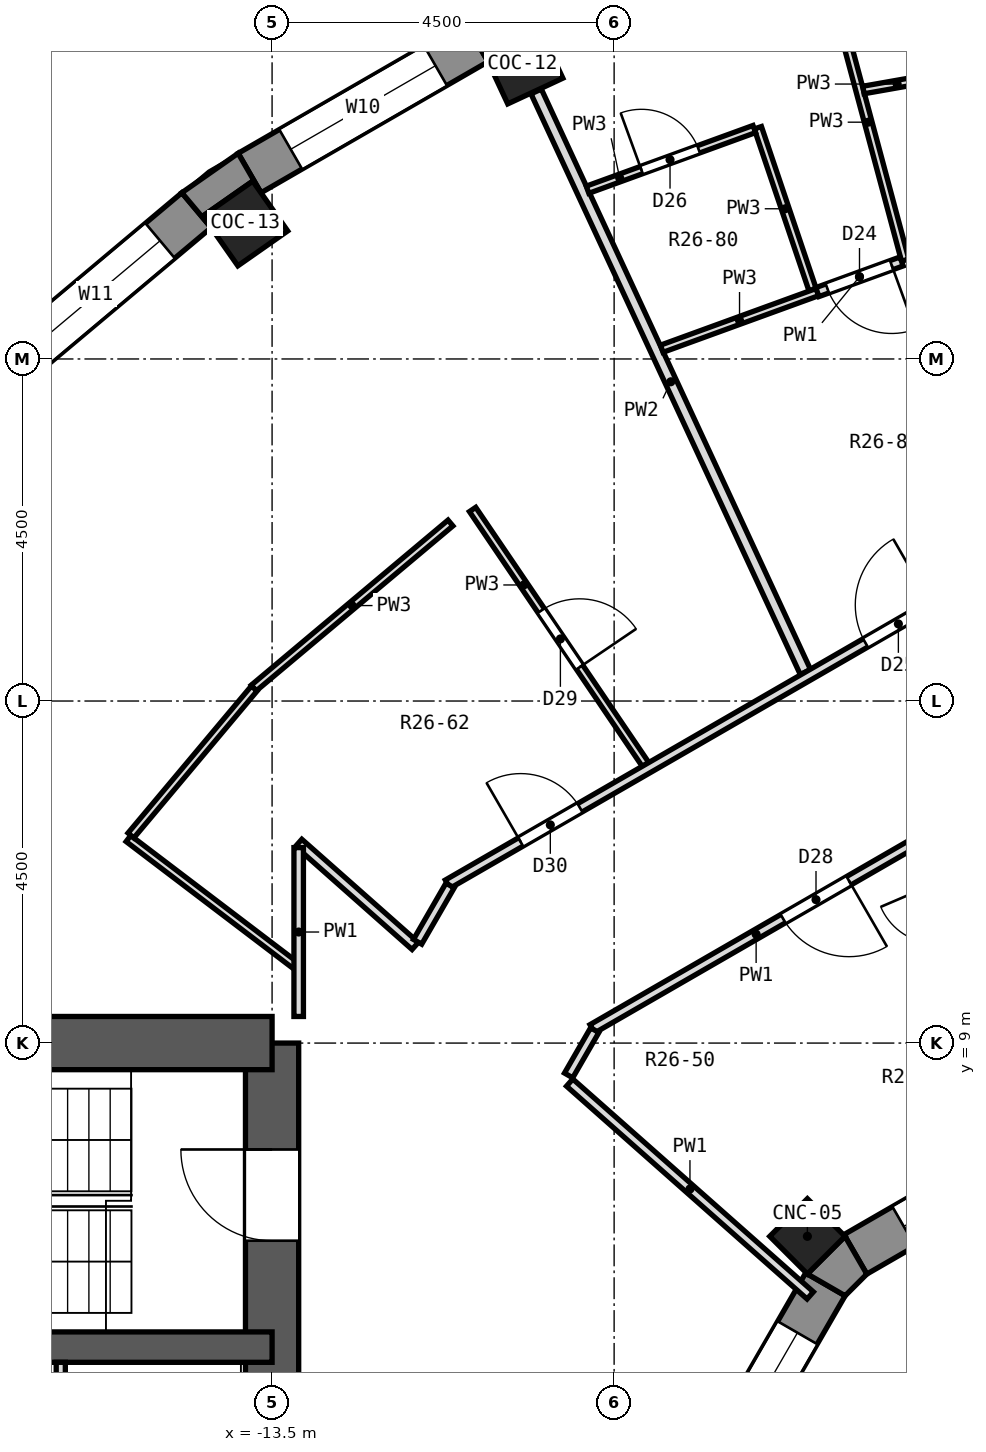
"""IFC4 building model, lengths in metres.
Left out: names, types, materials, properties, quantities, classifications, styles, units other than length and angle.
Written with IfcOpenShell. Run it as: python <this file> out.ifc"""

import sys

from ifc_helpers import new_model, si_unit, direction, frame, frame_2d, origin, origin_2d, place, context, subcontext, project, spatial, polyline, rectangle, outline, extrude, element, fill, save


model = new_model("IFC4")
c1 = context("Model", 3, precision=1e-05, world=origin(), true_north=direction((0.0, 1.0)))
c2 = subcontext(c1, "Body", "Model", "MODEL_VIEW")
j1 = project(units=[si_unit("LENGTHUNIT", "METRE"), si_unit("PLANEANGLEUNIT", "RADIAN")], contexts=[c1])
p1 = place(None, origin())
s1 = spatial("IfcSite", under=j1, at=p1, CompositionType="ELEMENT")
p2 = place(p1, origin())
s2 = spatial("IfcBuilding", under=s1, at=p2, CompositionType="ELEMENT")
p3 = place(p2, frame((0.0, 0.0, 170.7)))
s3 = spatial("IfcBuildingStorey", under=s2, at=p3, CompositionType="ELEMENT", Elevation=170.7)
for number, where, z_axis, x_axis in (
    (1, (-10.206, 21.887, 0.0), (0.0, 0.0, 1.0), (-0.423, 0.906, 0.0)),
    (2, (-13.852, 19.782, 0.0), (0.0, 0.0, 1.0), (-0.574, 0.819, 0.0)),
):
    element("IfcColumn", number, at=place(p3, frame(where, z_axis=z_axis, x_axis=x_axis)), inside=s3, PredefinedType="COLUMN", context=c2, shape_type="SweptSolid", body=[
        extrude(rectangle(XDim=0.8, YDim=0.8, at=origin_2d()), origin(), (0.0, 0.0, 1.0), 3.3),
    ])
p4 = place(p3, frame((-6.458, 6.458, 0.0), z_axis=(0.0, 0.0, 1.0), x_axis=(-0.707106781187, 0.707106781187, 0.0)))
e3 = element("IfcColumn", 3, at=p4, inside=s3, PredefinedType="COLUMN", context=c2, shape_type="SweptSolid", body=[
    extrude(rectangle(XDim=0.7, YDim=0.7, at=origin_2d()), origin(), (0.0, 0.0, 1.0), 3.3),
])
p5 = place(p3, frame((-13.5, -9.0, 0.0), z_axis=(0.0, 0.0, 1.0), x_axis=(0.0, 1.0, 0.0)))
e4 = element("IfcWall", 4, at=p5, inside=s3, PredefinedType="SHEAR", context=c2, shape_type="SweptSolid", body=[
    extrude(rectangle(XDim=18.0, YDim=0.7, at=frame_2d((9.0, 0.0))), origin(), (0.0, 0.0, 1.0), 3.3),
])
p6 = place(p5, frame((15.4, 0.0, 0.0)))
e5 = element("IfcOpeningElement", 5, at=p6, cuts=e4, PredefinedType="OPENING", context=c2, shape_type="SweptSolid", body=[
    extrude(rectangle(XDim=1.2, YDim=2.1, at=frame_2d((0.6, 1.05))), frame((0.0, 0.362, 0.0), z_axis=(0.0, -1.0, 0.0), x_axis=(1.0, 0.0, 0.0)), (0.0, 0.0, 1.0), 0.724),
])
p7 = place(p5, frame((1.4, 0.0, 0.0)))
e6 = element("IfcOpeningElement", 6, at=p7, cuts=e4, PredefinedType="OPENING", context=c2, shape_type="SweptSolid", body=[
    extrude(rectangle(XDim=1.2, YDim=2.1, at=frame_2d((0.6, 1.05))), frame((0.0, 0.362, 0.0), z_axis=(0.0, -1.0, 0.0), x_axis=(1.0, 0.0, 0.0)), (0.0, 0.0, 1.0), 0.724),
])
p8 = place(p5, frame((7.5, 0.0, 0.0)))
e7 = element("IfcOpeningElement", 7, at=p8, cuts=e4, PredefinedType="OPENING", context=c2, shape_type="SweptSolid", body=[
    extrude(rectangle(XDim=3.0, YDim=2.4, at=frame_2d((1.5, 1.2))), frame((0.0, 0.362, 0.0), z_axis=(0.0, -1.0, 0.0), x_axis=(1.0, 0.0, 0.0)), (0.0, 0.0, 1.0), 0.724),
])
p9 = place(p3, frame((-13.5, 9.0, 0.0), z_axis=(0.0, 0.0, 1.0), x_axis=(-1.0, 0.0, 0.0)))
e8 = element("IfcWall", 8, at=p9, inside=s3, PredefinedType="SHEAR", context=c2, shape_type="SweptSolid", body=[
    extrude(rectangle(XDim=8.0, YDim=0.7, at=frame_2d((4.0, 0.0))), origin(), (0.0, 0.0, 1.0), 3.3),
])
p10 = place(p3, frame((-13.5, 5.0, 0.0), z_axis=(0.0, 0.0, 1.0), x_axis=(-1.0, 0.0, 0.0)))
e9 = element("IfcWall", 9, at=p10, inside=s3, PredefinedType="SHEAR", context=c2, shape_type="SweptSolid", body=[
    extrude(rectangle(XDim=8.0, YDim=0.4, at=frame_2d((4.0, 0.0))), origin(), (0.0, 0.0, 1.0), 3.3),
])
p11 = place(p10, frame((6.285, 0.0, 0.0)))
e10 = element("IfcOpeningElement", 10, at=p11, cuts=e9, PredefinedType="OPENING", context=c2, shape_type="SweptSolid", body=[
    extrude(rectangle(XDim=0.9, YDim=2.1, at=frame_2d((0.45, 1.05))), frame((0.0, 0.212, 0.0), z_axis=(0.0, -1.0, 0.0), x_axis=(1.0, 0.0, 0.0)), (0.0, 0.0, 1.0), 0.424),
])
p12 = place(p3, frame((-10.809, 22.171, 0.0), z_axis=(0.0, 0.0, 1.0), x_axis=(-0.86602648383, -0.499998129301, 0.0)))
e11 = element("IfcWall", 11, at=p12, inside=s3, PredefinedType="SOLIDWALL", context=c2, shape_type="SweptSolid", body=[
    extrude(rectangle(XDim=3.45, YDim=0.6, at=frame_2d((1.725, 0.0))), origin(), (0.0, 0.0, 1.0), 2.85),
])
p13 = place(p12, frame((0.625, 0.0, 0.9)))
e12 = element("IfcOpeningElement", 12, at=p13, cuts=e11, PredefinedType="OPENING", context=c2, shape_type="SweptSolid", body=[
    extrude(rectangle(XDim=2.2, YDim=1.8, at=frame_2d((1.1, 0.9))), frame((0.0, 0.312, 0.0), z_axis=(0.0, -1.0, 0.0), x_axis=(1.0, 0.0, 0.0)), (0.0, 0.0, 1.0), 0.624),
])
p14 = place(p3, frame((-14.494, 19.957, 0.0), z_axis=(0.0, 0.0, 1.0), x_axis=(-0.766058884809, -0.642770398358, 0.0)))
e13 = element("IfcWall", 13, at=p14, inside=s3, PredefinedType="SOLIDWALL", context=c2, shape_type="SweptSolid", body=[
    extrude(rectangle(XDim=3.449, YDim=0.6, at=frame_2d((1.725, 0.0))), origin(), (0.0, 0.0, 1.0), 2.85),
])
p15 = place(p14, frame((0.625, 0.0, 0.9)))
e14 = element("IfcOpeningElement", 14, at=p15, cuts=e13, PredefinedType="OPENING", context=c2, shape_type="SweptSolid", body=[
    extrude(rectangle(XDim=2.2, YDim=1.8, at=frame_2d((1.1, 0.9))), frame((0.0, 0.312, 0.0), z_axis=(0.0, -1.0, 0.0), x_axis=(1.0, 0.0, 0.0)), (0.0, 0.0, 1.0), 0.624),
])
p16 = place(p3, origin())
e15 = element("IfcWall", 15, at=p16, inside=s3, PredefinedType="SOLIDWALL", context=c2, shape_type="SweptSolid", body=[
    extrude(outline(polyline([(-10.959, 22.431), (-10.659, 21.911), (-10.738, 22.081), (-10.013, 22.419), (-9.934, 22.249), (-10.139, 22.813), (-10.959, 22.431)])), origin(), (0.0, 0.0, 1.0), 2.85),
])
p17 = place(p3, origin())
e16 = element("IfcWall", 16, at=p17, inside=s3, PredefinedType="SOLIDWALL", context=c2, shape_type="SweptSolid", body=[
    extrude(outline(polyline([(-13.946, 20.706), (-14.687, 20.187), (-14.302, 19.727), (-14.409, 19.881), (-13.754, 20.34), (-13.646, 20.186), (-13.946, 20.706)])), origin(), (0.0, 0.0, 1.0), 2.85),
])
p18 = place(p3, frame((-2.474, 8.156, 0.0), z_axis=(0.0, 0.0, 1.0), x_axis=(-0.866005929495, -0.500033728941, 0.0)))
e17 = element("IfcWall", 17, at=p18, inside=s3, PredefinedType="SOLIDWALL", context=c2, shape_type="SweptSolid", body=[
    extrude(rectangle(XDim=3.87, YDim=0.6, at=frame_2d((1.935, 0.0))), origin(), (0.0, 0.0, 1.0), 2.85),
])
p19 = place(p18, frame((0.735, 0.0, 0.9)))
e18 = element("IfcOpeningElement", 18, at=p19, cuts=e17, PredefinedType="OPENING", context=c2, shape_type="SweptSolid", body=[
    extrude(rectangle(XDim=2.4, YDim=1.8, at=frame_2d((1.2, 0.9))), frame((0.0, 0.312, 0.0), z_axis=(0.0, -1.0, 0.0), x_axis=(1.0, 0.0, 0.0)), (0.0, 0.0, 1.0), 0.624),
])
p20 = place(p3, frame((-6.22, 5.826, 0.0), z_axis=(0.0, 0.0, 1.0), x_axis=(-0.500033728941, -0.866005929495, 0.0)))
e19 = element("IfcWall", 19, at=p20, inside=s3, PredefinedType="SOLIDWALL", context=c2, shape_type="SweptSolid", body=[
    extrude(rectangle(XDim=3.87, YDim=0.6, at=frame_2d((1.935, 0.0))), origin(), (0.0, 0.0, 1.0), 2.85),
])
p21 = place(p20, frame((0.735, 0.0, 0.9)))
e20 = element("IfcOpeningElement", 20, at=p21, cuts=e19, PredefinedType="OPENING", context=c2, shape_type="SweptSolid", body=[
    extrude(rectangle(XDim=2.4, YDim=1.8, at=frame_2d((1.2, 0.9))), frame((0.0, 0.312, 0.0), z_axis=(0.0, -1.0, 0.0), x_axis=(1.0, 0.0, 0.0)), (0.0, 0.0, 1.0), 0.624),
])
p22 = place(p3, origin())
e21 = element("IfcWall", 21, at=p22, inside=s3, PredefinedType="SOLIDWALL", context=c2, shape_type="SweptSolid", body=[
    extrude(outline(polyline([(-6.458, 5.962), (-5.961, 5.676), (-5.676, 5.961), (-5.962, 6.458), (-6.458, 5.962)])), origin(), (0.0, 0.0, 1.0), 2.85),
])
p23 = place(p3, frame((-6.145, 22.931, 0.0), z_axis=(0.0, 0.0, 1.0), x_axis=(0.259065026248, -0.965859882268, 0.0)))
e22 = element("IfcWall", 22, at=p23, inside=s3, PredefinedType="PARTITIONING", context=c2, shape_type="SweptSolid", body=[
    extrude(rectangle(XDim=3.759, YDim=0.1, at=frame_2d((1.88, 0.0))), origin(), (0.0, 0.0, 1.0), 2.85),
])
p24 = place(p3, frame((-7.109, 21.042, 0.0), z_axis=(0.0, 0.0, 1.0), x_axis=(0.320001473527, -0.947417044886, 0.0)))
e23 = element("IfcWall", 23, at=p24, inside=s3, PredefinedType="PARTITIONING", context=c2, shape_type="SweptSolid", body=[
    extrude(rectangle(XDim=2.25, YDim=0.1, at=frame_2d((1.125, 0.0))), origin(), (0.0, 0.0, 1.0), 2.85),
])
p25 = place(p3, frame((-10.026, 21.519, 0.0), z_axis=(0.0, 0.0, 1.0), x_axis=(0.420738120606, -0.907182139302, 0.0)))
e24 = element("IfcWall", 24, at=p25, inside=s3, PredefinedType="PARTITIONING", context=c2, shape_type="SweptSolid", body=[
    extrude(rectangle(XDim=8.42, YDim=0.15, at=frame_2d((4.21, 0.0))), origin(), (0.0, 0.0, 1.0), 2.85),
])
p26 = place(p3, frame((-10.862, 16.02, 0.0), z_axis=(0.0, 0.0, 1.0), x_axis=(0.5612995905, -0.827612693054, 0.0)))
e25 = element("IfcWall", 25, at=p26, inside=s3, PredefinedType="PARTITIONING", context=c2, shape_type="SweptSolid", body=[
    extrude(rectangle(XDim=4.053, YDim=0.1, at=frame_2d((2.026, 0.0))), origin(), (0.0, 0.0, 1.0), 2.85),
])
p27 = place(p26, frame((1.608, 0.0, 0.0)))
e26 = element("IfcOpeningElement", 26, at=p27, cuts=e25, PredefinedType="OPENING", context=c2, shape_type="SweptSolid", body=[
    extrude(rectangle(XDim=0.9, YDim=2.1, at=frame_2d((0.45, 1.05))), frame((0.0, 0.062, 0.0), z_axis=(0.0, -1.0, 0.0), x_axis=(1.0, 0.0, 0.0)), (0.0, 0.0, 1.0), 0.124),
])
p28 = place(p3, frame((-13.15, 11.634, 0.0), z_axis=(0.0, 0.0, 1.0), x_axis=(0.74902616167, -0.662540420754, 0.0)))
e27 = element("IfcWall", 27, at=p28, inside=s3, PredefinedType="PARTITIONING", context=c2, shape_type="SweptSolid", body=[
    extrude(rectangle(XDim=2.047, YDim=0.125, at=frame_2d((1.023, 0.0))), origin(), (0.0, 0.0, 1.0), 2.85),
])
p29 = place(p3, frame((-9.585, 8.48, 0.0), z_axis=(0.0, 0.0, 1.0), x_axis=(0.748972302021, -0.662601306069, 0.0)))
e28 = element("IfcWall", 28, at=p29, inside=s3, PredefinedType="PARTITIONING", context=c2, shape_type="SweptSolid", body=[
    extrude(rectangle(XDim=4.226, YDim=0.125, at=frame_2d((2.113, 0.0))), origin(), (0.0, 0.0, 1.0), 2.85),
])
p30 = place(p3, frame((-15.39, 11.691, 0.0), z_axis=(0.0, 0.0, 1.0), x_axis=(0.796245993269, -0.604972989647, 0.0)))
e29 = element("IfcWall", 29, at=p30, inside=s3, PredefinedType="PARTITIONING", context=c2, shape_type="SweptSolid", body=[
    extrude(rectangle(XDim=2.751, YDim=0.1, at=frame_2d((1.375, 0.0))), origin(), (0.0, 0.0, 1.0), 2.85),
])
p31 = place(p3, frame((-5.72, 21.539, 0.0), z_axis=(0.0, 0.0, 1.0), x_axis=(0.984809591131, 0.173637752855, 0.0)))
e30 = element("IfcWall", 30, at=p31, inside=s3, PredefinedType="PARTITIONING", context=c2, shape_type="SweptSolid", body=[
    extrude(rectangle(XDim=2.359, YDim=0.1, at=frame_2d((1.18, 0.0))), origin(), (0.0, 0.0, 1.0), 2.85),
])
p32 = place(p31, frame((0.78, 0.0, 0.0)))
e31 = element("IfcOpeningElement", 31, at=p32, cuts=e30, PredefinedType="OPENING", context=c2, shape_type="SweptSolid", body=[
    extrude(rectangle(XDim=0.8, YDim=2.1, at=frame_2d((0.4, 1.05))), frame((0.0, 0.062, 0.0), z_axis=(0.0, -1.0, 0.0), x_axis=(1.0, 0.0, 0.0)), (0.0, 0.0, 1.0), 0.124),
])
p33 = place(p3, frame((-8.374, 18.135, 0.0), z_axis=(0.0, 0.0, 1.0), x_axis=(0.939750886848, 0.341860016189, 0.0)))
e32 = element("IfcWall", 32, at=p33, inside=s3, PredefinedType="PARTITIONING", context=c2, shape_type="SweptSolid", body=[
    extrude(rectangle(XDim=2.179, YDim=0.1, at=frame_2d((1.089, 0.0))), origin(), (0.0, 0.0, 1.0), 2.85),
])
p34 = place(p3, frame((-6.326, 18.88, 0.0), z_axis=(0.0, 0.0, 1.0), x_axis=(0.939672449317, 0.342075558896, 0.0)))
e33 = element("IfcWall", 33, at=p34, inside=s3, PredefinedType="PARTITIONING", context=c2, shape_type="SweptSolid", body=[
    extrude(rectangle(XDim=1.179, YDim=0.125, at=frame_2d((0.589, 0.0))), origin(), (0.0, 0.0, 1.0), 2.85),
])
p35 = place(p34, frame((0.139, 0.0, 0.0)))
e34 = element("IfcOpeningElement", 34, at=p35, cuts=e33, PredefinedType="OPENING", context=c2, shape_type="SweptSolid", body=[
    extrude(rectangle(XDim=0.9, YDim=2.1, at=frame_2d((0.45, 1.05))), frame((0.0, 0.074, 0.0), z_axis=(0.0, -1.0, 0.0), x_axis=(1.0, 0.0, 0.0)), (0.0, 0.0, 1.0), 0.149),
])
p36 = place(p3, frame((-9.35, 20.227, 0.0), z_axis=(0.0, 0.0, 1.0), x_axis=(0.939701781882, 0.341994972371, 0.0)))
e35 = element("IfcWall", 35, at=p36, inside=s3, PredefinedType="PARTITIONING", context=c2, shape_type="SweptSolid", body=[
    extrude(rectangle(XDim=2.334, YDim=0.1, at=frame_2d((1.167, 0.0))), origin(), (0.0, 0.0, 1.0), 2.85),
])
p37 = place(p36, frame((0.755, 0.0, 0.0)))
e36 = element("IfcOpeningElement", 36, at=p37, cuts=e35, PredefinedType="OPENING", context=c2, shape_type="SweptSolid", body=[
    extrude(rectangle(XDim=0.8, YDim=2.1, at=frame_2d((0.4, 1.05))), frame((0.0, 0.062, 0.0), z_axis=(0.0, -1.0, 0.0), x_axis=(1.0, 0.0, 0.0)), (0.0, 0.0, 1.0), 0.124),
])
p38 = place(p3, frame((-9.287, 9.188, 0.0), z_axis=(0.0, 0.0, 1.0), x_axis=(0.866054867757, 0.499948963429, 0.0)))
e37 = element("IfcWall", 37, at=p38, inside=s3, PredefinedType="PARTITIONING", context=c2, shape_type="SweptSolid", body=[
    extrude(rectangle(XDim=4.976, YDim=0.125, at=frame_2d((2.488, 0.0))), origin(), (0.0, 0.0, 1.0), 2.85),
])
p39 = place(p38, frame((2.898, 0.0, 0.0)))
e38 = element("IfcOpeningElement", 38, at=p39, cuts=e37, PredefinedType="OPENING", context=c2, shape_type="SweptSolid", body=[
    extrude(rectangle(XDim=1.0, YDim=2.1, at=frame_2d((0.5, 1.05))), frame((0.0, 0.074, 0.0), z_axis=(0.0, -1.0, 0.0), x_axis=(1.0, 0.0, 0.0)), (0.0, 0.0, 1.0), 0.149),
])
p40 = place(p3, frame((-11.189, 11.091, 0.0), z_axis=(0.0, 0.0, 1.0), x_axis=(0.865999621737, 0.500044653157, 0.0)))
e39 = element("IfcWall", 39, at=p40, inside=s3, PredefinedType="PARTITIONING", context=c2, shape_type="SweptSolid", body=[
    extrude(rectangle(XDim=8.155, YDim=0.125, at=frame_2d((4.078, 0.0))), origin(), (0.0, 0.0, 1.0), 2.85),
])
p41 = place(p40, frame((6.346, 0.0, 0.0)))
e40 = element("IfcOpeningElement", 40, at=p41, cuts=e39, PredefinedType="OPENING", context=c2, shape_type="SweptSolid", body=[
    extrude(rectangle(XDim=1.0, YDim=2.1, at=frame_2d((0.5, 1.05))), frame((0.0, 0.074, 0.0), z_axis=(0.0, -1.0, 0.0), x_axis=(1.0, 0.0, 0.0)), (0.0, 0.0, 1.0), 0.149),
])
p42 = place(p40, frame((1.109, 0.0, 0.0)))
e41 = element("IfcOpeningElement", 41, at=p42, cuts=e39, PredefinedType="OPENING", context=c2, shape_type="SweptSolid", body=[
    extrude(rectangle(XDim=0.9, YDim=2.1, at=frame_2d((0.45, 1.05))), frame((0.0, 0.074, 0.0), z_axis=(0.0, -1.0, 0.0), x_axis=(1.0, 0.0, 0.0)), (0.0, 0.0, 1.0), 0.149),
])
p43 = place(p3, frame((-13.742, 13.67, 0.0), z_axis=(0.0, 0.0, 1.0), x_axis=(0.766150226106, 0.642661521361, 0.0)))
e42 = element("IfcWall", 42, at=p43, inside=s3, PredefinedType="PARTITIONING", context=c2, shape_type="SweptSolid", body=[
    extrude(rectangle(XDim=3.379, YDim=0.1, at=frame_2d((1.689, 0.0))), origin(), (0.0, 0.0, 1.0), 2.85),
])
p44 = place(p3, frame((-15.357, 11.731, 0.0), z_axis=(0.0, 0.0, 1.0), x_axis=(0.64263607703, 0.76617156858, 0.0)))
e43 = element("IfcWall", 43, at=p44, inside=s3, PredefinedType="PARTITIONING", context=c2, shape_type="SweptSolid", body=[
    extrude(rectangle(XDim=2.524, YDim=0.1, at=frame_2d((1.262, 0.0))), origin(), (0.0, 0.0, 1.0), 2.85),
])
p45 = place(p3, frame((-9.599, 8.574, 0.0), z_axis=(0.0, 0.0, 1.0), x_axis=(0.499804398801, 0.866138304741, 0.0)))
e44 = element("IfcWall", 44, at=p45, inside=s3, PredefinedType="PARTITIONING", context=c2, shape_type="SweptSolid", body=[
    extrude(rectangle(XDim=0.688, YDim=0.125, at=frame_2d((0.344, 0.0))), origin(), (0.0, 0.0, 1.0), 2.85),
])
p46 = place(p3, frame((-11.586, 10.332, 0.0), z_axis=(0.0, 0.0, 1.0), x_axis=(0.499854250852, 0.866109535743, 0.0)))
e45 = element("IfcWall", 45, at=p46, inside=s3, PredefinedType="PARTITIONING", context=c2, shape_type="SweptSolid", body=[
    extrude(rectangle(XDim=0.855, YDim=0.125, at=frame_2d((0.428, 0.0))), origin(), (0.0, 0.0, 1.0), 2.85),
])
p47 = place(p3, frame((-13.15, 9.35, 0.0), z_axis=(0.0, 0.0, 1.0), x_axis=(0.0, 1.0, 0.0)))
e46 = element("IfcWall", 46, at=p47, inside=s3, PredefinedType="PARTITIONING", context=c2, shape_type="SweptSolid", body=[
    extrude(rectangle(XDim=2.221, YDim=0.125, at=frame_2d((1.111, 0.0))), origin(), (0.0, 0.0, 1.0), 2.85),
])
p48 = place(p3, frame((-16.28, 2.2, 0.0), z_axis=(0.0, 0.0, 1.0), x_axis=(0.0, 1.0, 0.0)))
e47 = element("IfcWall", 47, at=p48, inside=s3, PredefinedType="PARTITIONING", context=c2, shape_type="SweptSolid", body=[
    extrude(rectangle(XDim=2.6, YDim=0.12, at=frame_2d((1.3, 0.0))), origin(), (0.0, 0.0, 1.0), 2.85),
])
p49 = place(p13, origin())
e48 = element("IfcWindow", 48, at=p49, inside=s3, PartitioningType="SINGLE_PANEL", PredefinedType="WINDOW", context=c2, shape_type="SweptSolid", body=[
    extrude(rectangle(XDim=2.2, YDim=1.8, at=frame_2d((1.1, 0.9))), frame((0.0, 0.18, 0.0), z_axis=(0.0, -1.0, 0.0), x_axis=(1.0, 0.0, 0.0)), (0.0, 0.0, 1.0), 0.06),
])
fill(e12, e48)
p50 = place(p15, origin())
e49 = element("IfcWindow", 49, at=p50, inside=s3, PartitioningType="SINGLE_PANEL", PredefinedType="WINDOW", context=c2, shape_type="SweptSolid", body=[
    extrude(rectangle(XDim=2.2, YDim=1.8, at=frame_2d((1.1, 0.9))), frame((0.0, 0.18, 0.0), z_axis=(0.0, -1.0, 0.0), x_axis=(1.0, 0.0, 0.0)), (0.0, 0.0, 1.0), 0.06),
])
fill(e14, e49)
p51 = place(p19, origin())
e50 = element("IfcWindow", 50, at=p51, inside=s3, PartitioningType="SINGLE_PANEL", PredefinedType="WINDOW", context=c2, shape_type="SweptSolid", body=[
    extrude(rectangle(XDim=2.4, YDim=1.8, at=frame_2d((1.2, 0.9))), frame((0.0, -0.12, 0.0), z_axis=(0.0, -1.0, 0.0), x_axis=(1.0, 0.0, 0.0)), (0.0, 0.0, 1.0), 0.06),
])
fill(e18, e50)
p52 = place(p21, origin())
e51 = element("IfcWindow", 51, at=p52, inside=s3, PartitioningType="SINGLE_PANEL", PredefinedType="WINDOW", context=c2, shape_type="SweptSolid", body=[
    extrude(rectangle(XDim=2.4, YDim=1.8, at=frame_2d((1.2, 0.9))), frame((0.0, -0.12, 0.0), z_axis=(0.0, -1.0, 0.0), x_axis=(1.0, 0.0, 0.0)), (0.0, 0.0, 1.0), 0.06),
])
fill(e20, e51)
p53 = place(p35, frame((0.9, 0.0, 0.0), z_axis=(0.0, 0.0, 1.0), x_axis=(-1.0, 0.0, 0.0)))
e52 = element("IfcDoor", 52, at=p53, inside=s3, OperationType="SINGLE_SWING_LEFT", PredefinedType="DOOR", context=c2, shape_type="SweptSolid", body=[
    extrude(rectangle(XDim=0.9, YDim=2.1, at=frame_2d((0.45, 1.05))), frame((0.0, 0.025, 0.0), z_axis=(0.0, -1.0, 0.0), x_axis=(1.0, 0.0, 0.0)), (0.0, 0.0, 1.0), 0.05),
])
fill(e34, e52)
p54 = place(p41, origin())
e53 = element("IfcDoor", 53, at=p54, inside=s3, OperationType="SINGLE_SWING_RIGHT", PredefinedType="DOOR", context=c2, shape_type="SweptSolid", body=[
    extrude(rectangle(XDim=1.0, YDim=2.1, at=frame_2d((0.5, 1.05))), frame((0.0, 0.025, 0.0), z_axis=(0.0, -1.0, 0.0), x_axis=(1.0, 0.0, 0.0)), (0.0, 0.0, 1.0), 0.05),
])
fill(e40, e53)
p55 = place(p37, origin())
e54 = element("IfcDoor", 54, at=p55, inside=s3, OperationType="SINGLE_SWING_LEFT", PredefinedType="DOOR", context=c2, shape_type="SweptSolid", body=[
    extrude(rectangle(XDim=0.8, YDim=2.1, at=frame_2d((0.4, 1.05))), frame((0.0, 0.025, 0.0), z_axis=(0.0, -1.0, 0.0), x_axis=(1.0, 0.0, 0.0)), (0.0, 0.0, 1.0), 0.05),
])
fill(e36, e54)
p56 = place(p39, frame((1.0, 0.0, 0.0), z_axis=(0.0, 0.0, 1.0), x_axis=(-1.0, 0.0, 0.0)))
e55 = element("IfcDoor", 55, at=p56, inside=s3, OperationType="SINGLE_SWING_LEFT", PredefinedType="DOOR", context=c2, shape_type="SweptSolid", body=[
    extrude(rectangle(XDim=1.0, YDim=2.1, at=frame_2d((0.5, 1.05))), frame((0.0, 0.025, 0.0), z_axis=(0.0, -1.0, 0.0), x_axis=(1.0, 0.0, 0.0)), (0.0, 0.0, 1.0), 0.05),
])
fill(e38, e55)
p57 = place(p27, origin())
e56 = element("IfcDoor", 56, at=p57, inside=s3, OperationType="SINGLE_SWING_RIGHT", PredefinedType="DOOR", context=c2, shape_type="SweptSolid", body=[
    extrude(rectangle(XDim=0.9, YDim=2.1, at=frame_2d((0.45, 1.05))), frame((0.0, 0.025, 0.0), z_axis=(0.0, -1.0, 0.0), x_axis=(1.0, 0.0, 0.0)), (0.0, 0.0, 1.0), 0.05),
])
fill(e26, e56)
p58 = place(p42, origin())
e57 = element("IfcDoor", 57, at=p58, inside=s3, OperationType="SINGLE_SWING_LEFT", PredefinedType="DOOR", context=c2, shape_type="SweptSolid", body=[
    extrude(rectangle(XDim=0.9, YDim=2.1, at=frame_2d((0.45, 1.05))), frame((0.0, 0.025, 0.0), z_axis=(0.0, -1.0, 0.0), x_axis=(1.0, 0.0, 0.0)), (0.0, 0.0, 1.0), 0.05),
])
fill(e41, e57)
p59 = place(p6, origin())
e58 = element("IfcDoor", 58, at=p59, inside=s3, OperationType="SINGLE_SWING_RIGHT", PredefinedType="DOOR", context=c2, shape_type="SweptSolid", body=[
    extrude(rectangle(XDim=1.2, YDim=2.1, at=frame_2d((0.6, 1.05))), frame((0.0, 0.025, 0.0), z_axis=(0.0, -1.0, 0.0), x_axis=(1.0, 0.0, 0.0)), (0.0, 0.0, 1.0), 0.05),
])
fill(e5, e58)
save(model, sys.argv[1])
